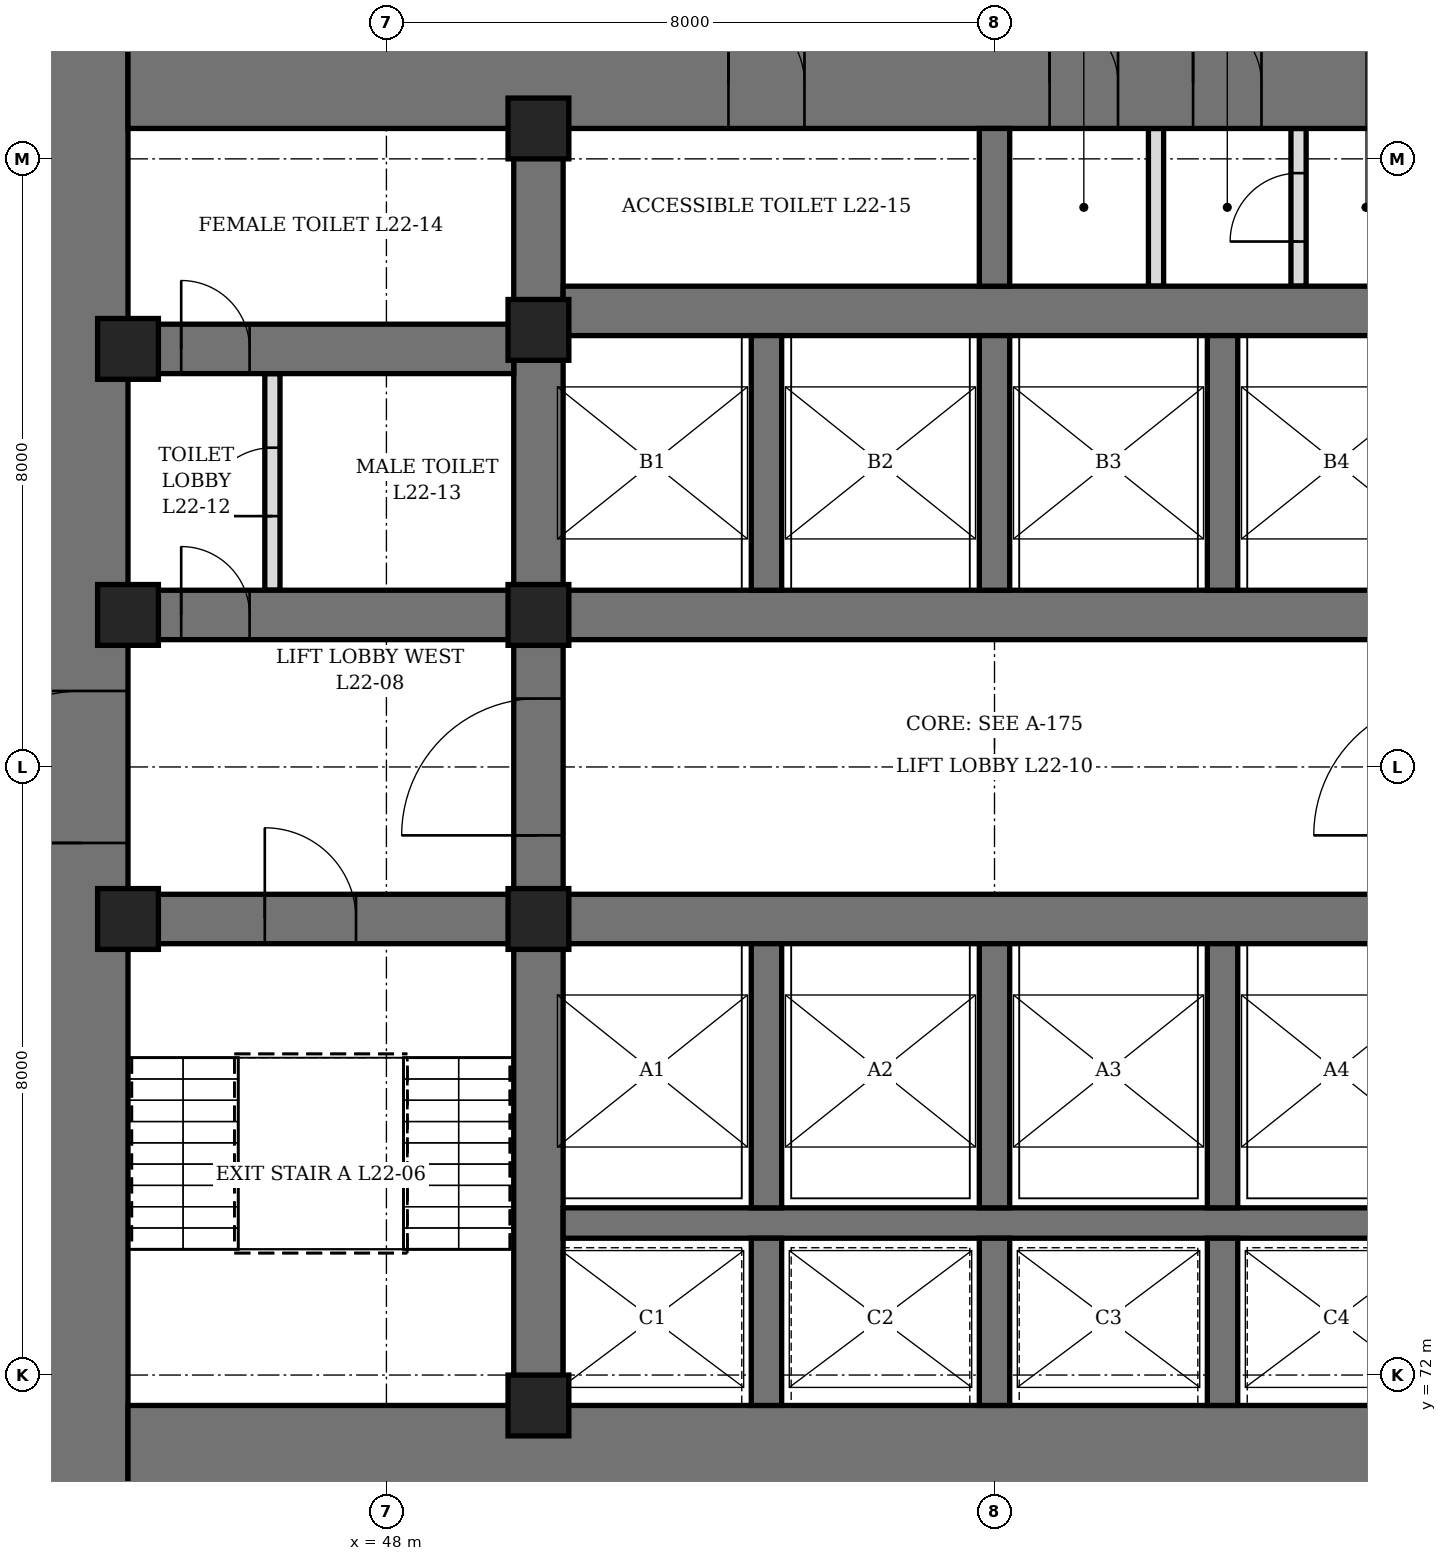
"""IFC4 building model, lengths in metres.
Left out: names, types, materials, properties, quantities, classifications, styles, units other than length and angle.
Written with IfcOpenShell. Run it as: python <this file> out.ifc"""

import sys

from ifc_helpers import new_model, si_unit, direction, frame, frame_2d, origin, origin_2d, place, context, subcontext, project, spatial, rectangle, hollow_rectangle, extrude, element, fill, save


model = new_model("IFC4")
c1 = context("Model", 3, precision=1e-05, world=origin(), true_north=direction((0.0, 1.0)))
c2 = subcontext(c1, "Body", "Model", "MODEL_VIEW")
j1 = project(units=[si_unit("LENGTHUNIT", "METRE"), si_unit("PLANEANGLEUNIT", "RADIAN")], contexts=[c1])
p1 = place(None, origin())
s1 = spatial("IfcSite", under=j1, at=p1, CompositionType="ELEMENT")
p2 = place(p1, origin())
s2 = spatial("IfcBuilding", under=s1, at=p2, CompositionType="ELEMENT")
p3 = place(p2, frame((0.0, 0.0, 102.1)))
s3 = spatial("IfcBuildingStorey", under=s2, at=p3, CompositionType="ELEMENT", Elevation=102.1)
p4 = place(p3, frame((44.0, 70.4, 0.0), z_axis=(0.0, 0.0, 1.0), x_axis=(0.0, 1.0, 0.0)))
e1 = element("IfcWall", 1, at=p4, inside=s3, PredefinedType="SHEAR", context=c2, shape_type="SweptSolid", body=[
    extrude(rectangle(XDim=19.2, YDim=1.2, at=frame_2d((9.6, 0.0))), origin(), (0.0, 0.0, 1.0), 6.0),
])
p5 = place(p4, frame((8.6, 0.0, 0.0)))
e2 = element("IfcOpeningElement", 2, at=p5, cuts=e1, PredefinedType="OPENING", context=c2, shape_type="SweptSolid", body=[
    extrude(rectangle(XDim=2.0, YDim=2.4, at=frame_2d((1.0, 1.2))), frame((0.0, 0.61, 0.0), z_axis=(0.0, -1.0, 0.0), x_axis=(1.0, 0.0, 0.0)), (0.0, 0.0, 1.0), 1.22),
])
p6 = place(p3, frame((44.6, 71.0, 0.0), z_axis=(0.0, 0.0, 1.0), x_axis=(1.0, 0.0, 0.0)))
e3 = element("IfcWall", 3, at=p6, inside=s3, PredefinedType="SHEAR", context=c2, shape_type="SweptSolid", body=[
    extrude(rectangle(XDim=22.8, YDim=1.2, at=frame_2d((11.4, 0.0))), origin(), (0.0, 0.0, 1.0), 6.0),
])
p7 = place(p3, frame((44.6, 89.0, 0.0), z_axis=(0.0, 0.0, 1.0), x_axis=(1.0, 0.0, 0.0)))
e4 = element("IfcWall", 4, at=p7, inside=s3, PredefinedType="SHEAR", context=c2, shape_type="SweptSolid", body=[
    extrude(rectangle(XDim=22.8, YDim=1.2, at=frame_2d((11.4, 0.0))), origin(), (0.0, 0.0, 1.0), 6.0),
])
p8 = place(p7, frame((7.9, 0.0, 0.0)))
e5 = element("IfcOpeningElement", 5, at=p8, cuts=e4, PredefinedType="OPENING", context=c2, shape_type="SweptSolid", body=[
    extrude(rectangle(XDim=1.0, YDim=2.1, at=frame_2d((0.5, 1.05))), frame((0.0, 0.61, 0.0), z_axis=(0.0, -1.0, 0.0), x_axis=(1.0, 0.0, 0.0)), (0.0, 0.0, 1.0), 1.22),
])
p9 = place(p7, frame((12.125, 0.0, 0.0)))
e6 = element("IfcOpeningElement", 6, at=p9, cuts=e4, PredefinedType="OPENING", context=c2, shape_type="SweptSolid", body=[
    extrude(rectangle(XDim=0.9, YDim=2.1, at=frame_2d((0.45, 1.05))), frame((0.0, 0.61, 0.0), z_axis=(0.0, -1.0, 0.0), x_axis=(1.0, 0.0, 0.0)), (0.0, 0.0, 1.0), 1.22),
])
p10 = place(p7, frame((14.012, 0.0, 0.0)))
e7 = element("IfcOpeningElement", 7, at=p10, cuts=e4, PredefinedType="OPENING", context=c2, shape_type="SweptSolid", body=[
    extrude(rectangle(XDim=0.9, YDim=2.1, at=frame_2d((0.45, 1.05))), frame((0.0, 0.61, 0.0), z_axis=(0.0, -1.0, 0.0), x_axis=(1.0, 0.0, 0.0)), (0.0, 0.0, 1.0), 1.22),
])
p11 = place(p3, frame((50.0, 71.6, 0.0), z_axis=(0.0, 0.0, 1.0), x_axis=(0.0, 1.0, 0.0)))
e8 = element("IfcWall", 8, at=p11, inside=s3, PredefinedType="SHEAR", context=c2, shape_type="SweptSolid", body=[
    extrude(rectangle(XDim=16.8, YDim=0.65, at=frame_2d((8.4, 0.0))), origin(), (0.0, 0.0, 1.0), 6.0),
])
p12 = place(p11, frame((7.5, 0.0, 0.0)))
e9 = element("IfcOpeningElement", 9, at=p12, cuts=e8, PredefinedType="OPENING", context=c2, shape_type="SweptSolid", body=[
    extrude(rectangle(XDim=1.8, YDim=2.4, at=frame_2d((0.9, 1.2))), frame((0.0, 0.335, 0.0), z_axis=(0.0, -1.0, 0.0), x_axis=(1.0, 0.0, 0.0)), (0.0, 0.0, 1.0), 0.67),
])
p13 = place(p3, frame((44.6, 78.0, 0.0), z_axis=(0.0, 0.0, 1.0), x_axis=(1.0, 0.0, 0.0)))
e10 = element("IfcWall", 10, at=p13, inside=s3, PredefinedType="SHEAR", context=c2, shape_type="SweptSolid", body=[
    extrude(rectangle(XDim=5.075, YDim=0.65, at=frame_2d((2.538, 0.0))), origin(), (0.0, 0.0, 1.0), 6.0),
])
p14 = place(p13, frame((1.8, 0.0, 0.0)))
e11 = element("IfcOpeningElement", 11, at=p14, cuts=e10, PredefinedType="OPENING", context=c2, shape_type="SweptSolid", body=[
    extrude(rectangle(XDim=1.2, YDim=2.1, at=frame_2d((0.6, 1.05))), frame((0.0, 0.335, 0.0), z_axis=(0.0, -1.0, 0.0), x_axis=(1.0, 0.0, 0.0)), (0.0, 0.0, 1.0), 0.67),
])
p15 = place(p3, frame((44.6, 82.0, 0.0), z_axis=(0.0, 0.0, 1.0), x_axis=(1.0, 0.0, 0.0)))
e12 = element("IfcWall", 12, at=p15, inside=s3, PredefinedType="SHEAR", context=c2, shape_type="SweptSolid", body=[
    extrude(rectangle(XDim=5.075, YDim=0.65, at=frame_2d((2.538, 0.0))), origin(), (0.0, 0.0, 1.0), 6.0),
])
p16 = place(p15, frame((0.7, 0.0, 0.0)))
e13 = element("IfcOpeningElement", 13, at=p16, cuts=e12, PredefinedType="OPENING", context=c2, shape_type="SweptSolid", body=[
    extrude(rectangle(XDim=0.9, YDim=2.1, at=frame_2d((0.45, 1.05))), frame((0.0, 0.335, 0.0), z_axis=(0.0, -1.0, 0.0), x_axis=(1.0, 0.0, 0.0)), (0.0, 0.0, 1.0), 0.67),
])
p17 = place(p3, frame((44.6, 85.5, 0.0), z_axis=(0.0, 0.0, 1.0), x_axis=(1.0, 0.0, 0.0)))
e14 = element("IfcWall", 14, at=p17, inside=s3, PredefinedType="SHEAR", context=c2, shape_type="SweptSolid", body=[
    extrude(rectangle(XDim=5.075, YDim=0.65, at=frame_2d((2.538, 0.0))), origin(), (0.0, 0.0, 1.0), 6.0),
])
p18 = place(p17, frame((0.7, 0.0, 0.0)))
e15 = element("IfcOpeningElement", 15, at=p18, cuts=e14, PredefinedType="OPENING", context=c2, shape_type="SweptSolid", body=[
    extrude(rectangle(XDim=0.9, YDim=2.1, at=frame_2d((0.45, 1.05))), frame((0.0, 0.335, 0.0), z_axis=(0.0, -1.0, 0.0), x_axis=(1.0, 0.0, 0.0)), (0.0, 0.0, 1.0), 0.67),
])
for number, where, z_axis, x_axis in (
    (16, (50.325, 78.0, 0.0), (0.0, 0.0, 1.0), (1.0, 0.0, 0.0)),
    (17, (50.325, 82.0, 0.0), (0.0, 0.0, 1.0), (1.0, 0.0, 0.0)),
    (18, (50.325, 86.0, 0.0), (0.0, 0.0, 1.0), (1.0, 0.0, 0.0)),
):
    element("IfcWall", number, at=place(p3, frame(where, z_axis=z_axis, x_axis=x_axis)), inside=s3, PredefinedType="SHEAR", context=c2, shape_type="SweptSolid", body=[
        extrude(rectangle(XDim=11.35, YDim=0.65, at=frame_2d((5.675, 0.0))), origin(), (0.0, 0.0, 1.0), 6.0),
    ])
p19 = place(p3, frame((50.325, 74.0, 0.0), z_axis=(0.0, 0.0, 1.0), x_axis=(1.0, 0.0, 0.0)))
e19 = element("IfcWall", 19, at=p19, inside=s3, PredefinedType="SHEAR", context=c2, shape_type="SweptSolid", body=[
    extrude(rectangle(XDim=11.35, YDim=0.4, at=frame_2d((5.675, 0.0))), origin(), (0.0, 0.0, 1.0), 6.0),
])
p20 = place(p3, frame((53.0, 71.6, 0.0), z_axis=(0.0, 0.0, 1.0), x_axis=(0.0, 1.0, 0.0)))
e20 = element("IfcWall", 20, at=p20, inside=s3, PredefinedType="SHEAR", context=c2, shape_type="SweptSolid", body=[
    extrude(rectangle(XDim=2.2, YDim=0.4, at=frame_2d((1.1, 0.0))), origin(), (0.0, 0.0, 1.0), 6.0),
])
p21 = place(p3, frame((53.0, 74.2, 0.0), z_axis=(0.0, 0.0, 1.0), x_axis=(0.0, 1.0, 0.0)))
e21 = element("IfcWall", 21, at=p21, inside=s3, PredefinedType="SHEAR", context=c2, shape_type="SweptSolid", body=[
    extrude(rectangle(XDim=3.475, YDim=0.4, at=frame_2d((1.738, 0.0))), origin(), (0.0, 0.0, 1.0), 6.0),
])
p22 = place(p3, frame((53.0, 82.325, 0.0), z_axis=(0.0, 0.0, 1.0), x_axis=(0.0, 1.0, 0.0)))
e22 = element("IfcWall", 22, at=p22, inside=s3, PredefinedType="SHEAR", context=c2, shape_type="SweptSolid", body=[
    extrude(rectangle(XDim=3.35, YDim=0.4, at=frame_2d((1.675, 0.0))), origin(), (0.0, 0.0, 1.0), 6.0),
])
p23 = place(p3, frame((56.0, 71.6, 0.0), z_axis=(0.0, 0.0, 1.0), x_axis=(0.0, 1.0, 0.0)))
e23 = element("IfcWall", 23, at=p23, inside=s3, PredefinedType="SHEAR", context=c2, shape_type="SweptSolid", body=[
    extrude(rectangle(XDim=2.2, YDim=0.4, at=frame_2d((1.1, 0.0))), origin(), (0.0, 0.0, 1.0), 6.0),
])
p24 = place(p3, frame((56.0, 74.2, 0.0), z_axis=(0.0, 0.0, 1.0), x_axis=(0.0, 1.0, 0.0)))
e24 = element("IfcWall", 24, at=p24, inside=s3, PredefinedType="SHEAR", context=c2, shape_type="SweptSolid", body=[
    extrude(rectangle(XDim=3.475, YDim=0.4, at=frame_2d((1.738, 0.0))), origin(), (0.0, 0.0, 1.0), 6.0),
])
p25 = place(p3, frame((56.0, 82.325, 0.0), z_axis=(0.0, 0.0, 1.0), x_axis=(0.0, 1.0, 0.0)))
e25 = element("IfcWall", 25, at=p25, inside=s3, PredefinedType="SHEAR", context=c2, shape_type="SweptSolid", body=[
    extrude(rectangle(XDim=3.35, YDim=0.4, at=frame_2d((1.675, 0.0))), origin(), (0.0, 0.0, 1.0), 6.0),
])
p26 = place(p3, frame((59.0, 71.6, 0.0), z_axis=(0.0, 0.0, 1.0), x_axis=(0.0, 1.0, 0.0)))
e26 = element("IfcWall", 26, at=p26, inside=s3, PredefinedType="SHEAR", context=c2, shape_type="SweptSolid", body=[
    extrude(rectangle(XDim=2.2, YDim=0.4, at=frame_2d((1.1, 0.0))), origin(), (0.0, 0.0, 1.0), 6.0),
])
p27 = place(p3, frame((59.0, 74.2, 0.0), z_axis=(0.0, 0.0, 1.0), x_axis=(0.0, 1.0, 0.0)))
e27 = element("IfcWall", 27, at=p27, inside=s3, PredefinedType="SHEAR", context=c2, shape_type="SweptSolid", body=[
    extrude(rectangle(XDim=3.475, YDim=0.4, at=frame_2d((1.738, 0.0))), origin(), (0.0, 0.0, 1.0), 6.0),
])
p28 = place(p3, frame((59.0, 82.325, 0.0), z_axis=(0.0, 0.0, 1.0), x_axis=(0.0, 1.0, 0.0)))
e28 = element("IfcWall", 28, at=p28, inside=s3, PredefinedType="SHEAR", context=c2, shape_type="SweptSolid", body=[
    extrude(rectangle(XDim=3.35, YDim=0.4, at=frame_2d((1.675, 0.0))), origin(), (0.0, 0.0, 1.0), 6.0),
])
p29 = place(p3, frame((56.0, 86.325, 0.0), z_axis=(0.0, 0.0, 1.0), x_axis=(0.0, 1.0, 0.0)))
e29 = element("IfcWall", 29, at=p29, inside=s3, PredefinedType="SHEAR", context=c2, shape_type="SweptSolid", body=[
    extrude(rectangle(XDim=2.075, YDim=0.4, at=frame_2d((1.038, 0.0))), origin(), (0.0, 0.0, 1.0), 6.0),
])
for number, where, z_axis, x_axis in (
    (30, (44.6, 78.0, 0.0), (0.0, 0.0, 1.0), (1.0, 0.0, 0.0)),
    (31, (44.6, 82.0, 0.0), (0.0, 0.0, 1.0), (1.0, 0.0, 0.0)),
    (32, (44.6, 85.5, 0.0), (0.0, 0.0, 1.0), (1.0, 0.0, 0.0)),
    (33, (50.0, 71.6, 0.0), (0.0, 0.0, 1.0), (1.0, 0.0, 0.0)),
    (34, (50.0, 78.0, 0.0), (0.0, 0.0, 1.0), (1.0, 0.0, 0.0)),
    (35, (50.0, 82.0, 0.0), (0.0, 0.0, 1.0), (1.0, 0.0, 0.0)),
    (36, (50.0, 85.75, 0.0), (0.0, 0.0, 1.0), (1.0, 0.0, 0.0)),
    (37, (50.0, 88.4, 0.0), (0.0, 0.0, 1.0), (1.0, 0.0, 0.0)),
):
    element("IfcColumn", number, at=place(p3, frame(where, z_axis=z_axis, x_axis=x_axis)), inside=s3, PredefinedType="COLUMN", context=c2, shape_type="SweptSolid", body=[
        extrude(hollow_rectangle(XDim=0.8, YDim=0.8, WallThickness=0.1, at=origin_2d()), origin(), (0.0, 0.0, 1.0), 6.0),
    ])
p30 = place(p3, frame((46.5, 82.325, 0.0), z_axis=(0.0, 0.0, 1.0), x_axis=(0.0, 1.0, 0.0)))
e38 = element("IfcWall", 38, at=p30, inside=s3, PredefinedType="PARTITIONING", context=c2, shape_type="SweptSolid", body=[
    extrude(rectangle(XDim=2.85, YDim=0.2, at=frame_2d((1.425, 0.0))), origin(), (0.0, 0.0, 1.0), 5.75),
])
p31 = place(p30, frame((0.975, 0.0, 0.0)))
e39 = element("IfcOpeningElement", 39, at=p31, cuts=e38, PredefinedType="OPENING", context=c2, shape_type="SweptSolid", body=[
    extrude(rectangle(XDim=0.9, YDim=2.1, at=frame_2d((0.45, 1.05))), frame((0.0, 0.11, 0.0), z_axis=(0.0, -1.0, 0.0), x_axis=(1.0, 0.0, 0.0)), (0.0, 0.0, 1.0), 0.22),
])
p32 = place(p3, frame((60.0, 86.325, 0.0), z_axis=(0.0, 0.0, 1.0), x_axis=(0.0, 1.0, 0.0)))
e40 = element("IfcWall", 40, at=p32, inside=s3, PredefinedType="PARTITIONING", context=c2, shape_type="SweptSolid", body=[
    extrude(rectangle(XDim=2.075, YDim=0.2, at=frame_2d((1.038, 0.0))), origin(), (0.0, 0.0, 1.0), 5.75),
])
p33 = place(p32, frame((0.587, 0.0, 0.0)))
e41 = element("IfcOpeningElement", 41, at=p33, cuts=e40, PredefinedType="OPENING", context=c2, shape_type="SweptSolid", body=[
    extrude(rectangle(XDim=0.9, YDim=2.1, at=frame_2d((0.45, 1.05))), frame((0.0, 0.11, 0.0), z_axis=(0.0, -1.0, 0.0), x_axis=(1.0, 0.0, 0.0)), (0.0, 0.0, 1.0), 0.22),
])
p34 = place(p3, frame((58.125, 86.325, 0.0), z_axis=(0.0, 0.0, 1.0), x_axis=(0.0, 1.0, 0.0)))
e42 = element("IfcWall", 42, at=p34, inside=s3, PredefinedType="PARTITIONING", context=c2, shape_type="SweptSolid", body=[
    extrude(rectangle(XDim=2.075, YDim=0.2, at=frame_2d((1.038, 0.0))), origin(), (0.0, 0.0, 1.0), 5.75),
])
p35 = place(p16, origin())
e43 = element("IfcDoor", 43, at=p35, inside=s3, OperationType="SINGLE_SWING_LEFT", PredefinedType="DOOR", context=c2, shape_type="SweptSolid", body=[
    extrude(rectangle(XDim=0.9, YDim=2.1, at=frame_2d((0.45, 1.05))), frame((0.0, 0.325, 0.0), z_axis=(0.0, -1.0, 0.0), x_axis=(1.0, 0.0, 0.0)), (0.0, 0.0, 1.0), 0.649),
])
fill(e13, e43)
p36 = place(p31, origin())
e44 = element("IfcDoor", 44, at=p36, inside=s3, OperationType="SINGLE_SWING_RIGHT", PredefinedType="DOOR", context=c2, shape_type="SweptSolid", body=[
    extrude(rectangle(XDim=0.9, YDim=2.1, at=frame_2d((0.45, 1.05))), frame((0.0, 0.1, 0.0), z_axis=(0.0, -1.0, 0.0), x_axis=(1.0, 0.0, 0.0)), (0.0, 0.0, 1.0), 0.199),
])
fill(e39, e44)
p37 = place(p18, origin())
e45 = element("IfcDoor", 45, at=p37, inside=s3, OperationType="SINGLE_SWING_RIGHT", PredefinedType="DOOR", context=c2, shape_type="SweptSolid", body=[
    extrude(rectangle(XDim=0.9, YDim=2.1, at=frame_2d((0.45, 1.05))), frame((0.0, 0.325, 0.0), z_axis=(0.0, -1.0, 0.0), x_axis=(1.0, 0.0, 0.0)), (0.0, 0.0, 1.0), 0.649),
])
fill(e15, e45)
p38 = place(p8, origin())
e46 = element("IfcDoor", 46, at=p38, inside=s3, OperationType="SINGLE_SWING_LEFT", PredefinedType="DOOR", context=c2, shape_type="SweptSolid", body=[
    extrude(rectangle(XDim=1.0, YDim=2.1, at=frame_2d((0.5, 1.05))), frame((0.0, 0.35, 0.0), z_axis=(0.0, -1.0, 0.0), x_axis=(1.0, 0.0, 0.0)), (0.0, 0.0, 1.0), 0.7),
])
fill(e5, e46)
p39 = place(p9, origin())
e47 = element("IfcDoor", 47, at=p39, inside=s3, OperationType="SINGLE_SWING_LEFT", PredefinedType="DOOR", context=c2, shape_type="SweptSolid", body=[
    extrude(rectangle(XDim=0.9, YDim=2.1, at=frame_2d((0.45, 1.05))), frame((0.0, 0.35, 0.0), z_axis=(0.0, -1.0, 0.0), x_axis=(1.0, 0.0, 0.0)), (0.0, 0.0, 1.0), 0.7),
])
fill(e6, e47)
p40 = place(p10, origin())
e48 = element("IfcDoor", 48, at=p40, inside=s3, OperationType="SINGLE_SWING_LEFT", PredefinedType="DOOR", context=c2, shape_type="SweptSolid", body=[
    extrude(rectangle(XDim=0.9, YDim=2.1, at=frame_2d((0.45, 1.05))), frame((0.0, 0.35, 0.0), z_axis=(0.0, -1.0, 0.0), x_axis=(1.0, 0.0, 0.0)), (0.0, 0.0, 1.0), 0.7),
])
fill(e7, e48)
p41 = place(p33, origin())
e49 = element("IfcDoor", 49, at=p41, inside=s3, OperationType="SINGLE_SWING_LEFT", PredefinedType="DOOR", context=c2, shape_type="SweptSolid", body=[
    extrude(rectangle(XDim=0.9, YDim=2.1, at=frame_2d((0.45, 1.05))), frame((0.0, 0.1, 0.0), z_axis=(0.0, -1.0, 0.0), x_axis=(1.0, 0.0, 0.0)), (0.0, 0.0, 1.0), 0.199),
])
fill(e41, e49)
p42 = place(p14, origin())
e50 = element("IfcDoor", 50, at=p42, inside=s3, OperationType="SINGLE_SWING_LEFT", PredefinedType="DOOR", context=c2, shape_type="SweptSolid", body=[
    extrude(rectangle(XDim=1.2, YDim=2.1, at=frame_2d((0.6, 1.05))), frame((0.0, 0.325, 0.0), z_axis=(0.0, -1.0, 0.0), x_axis=(1.0, 0.0, 0.0)), (0.0, 0.0, 1.0), 0.649),
])
fill(e11, e50)
p43 = place(p5, origin())
e51 = element("IfcDoor", 51, at=p43, inside=s3, OperationType="DOUBLE_DOOR_SINGLE_SWING", PredefinedType="DOOR", context=c2, shape_type="SweptSolid", body=[
    extrude(rectangle(XDim=2.0, YDim=2.4, at=frame_2d((1.0, 1.2))), frame((0.0, 0.35, 0.0), z_axis=(0.0, -1.0, 0.0), x_axis=(1.0, 0.0, 0.0)), (0.0, 0.0, 1.0), 0.7),
])
fill(e2, e51)
p44 = place(p12, origin())
e52 = element("IfcDoor", 52, at=p44, inside=s3, OperationType="DOUBLE_DOOR_SINGLE_SWING", PredefinedType="DOOR", context=c2, shape_type="SweptSolid", body=[
    extrude(rectangle(XDim=1.8, YDim=2.4, at=frame_2d((0.9, 1.2))), frame((0.0, 0.325, 0.0), z_axis=(0.0, -1.0, 0.0), x_axis=(1.0, 0.0, 0.0)), (0.0, 0.0, 1.0), 0.649),
])
fill(e9, e52)
save(model, sys.argv[1])
